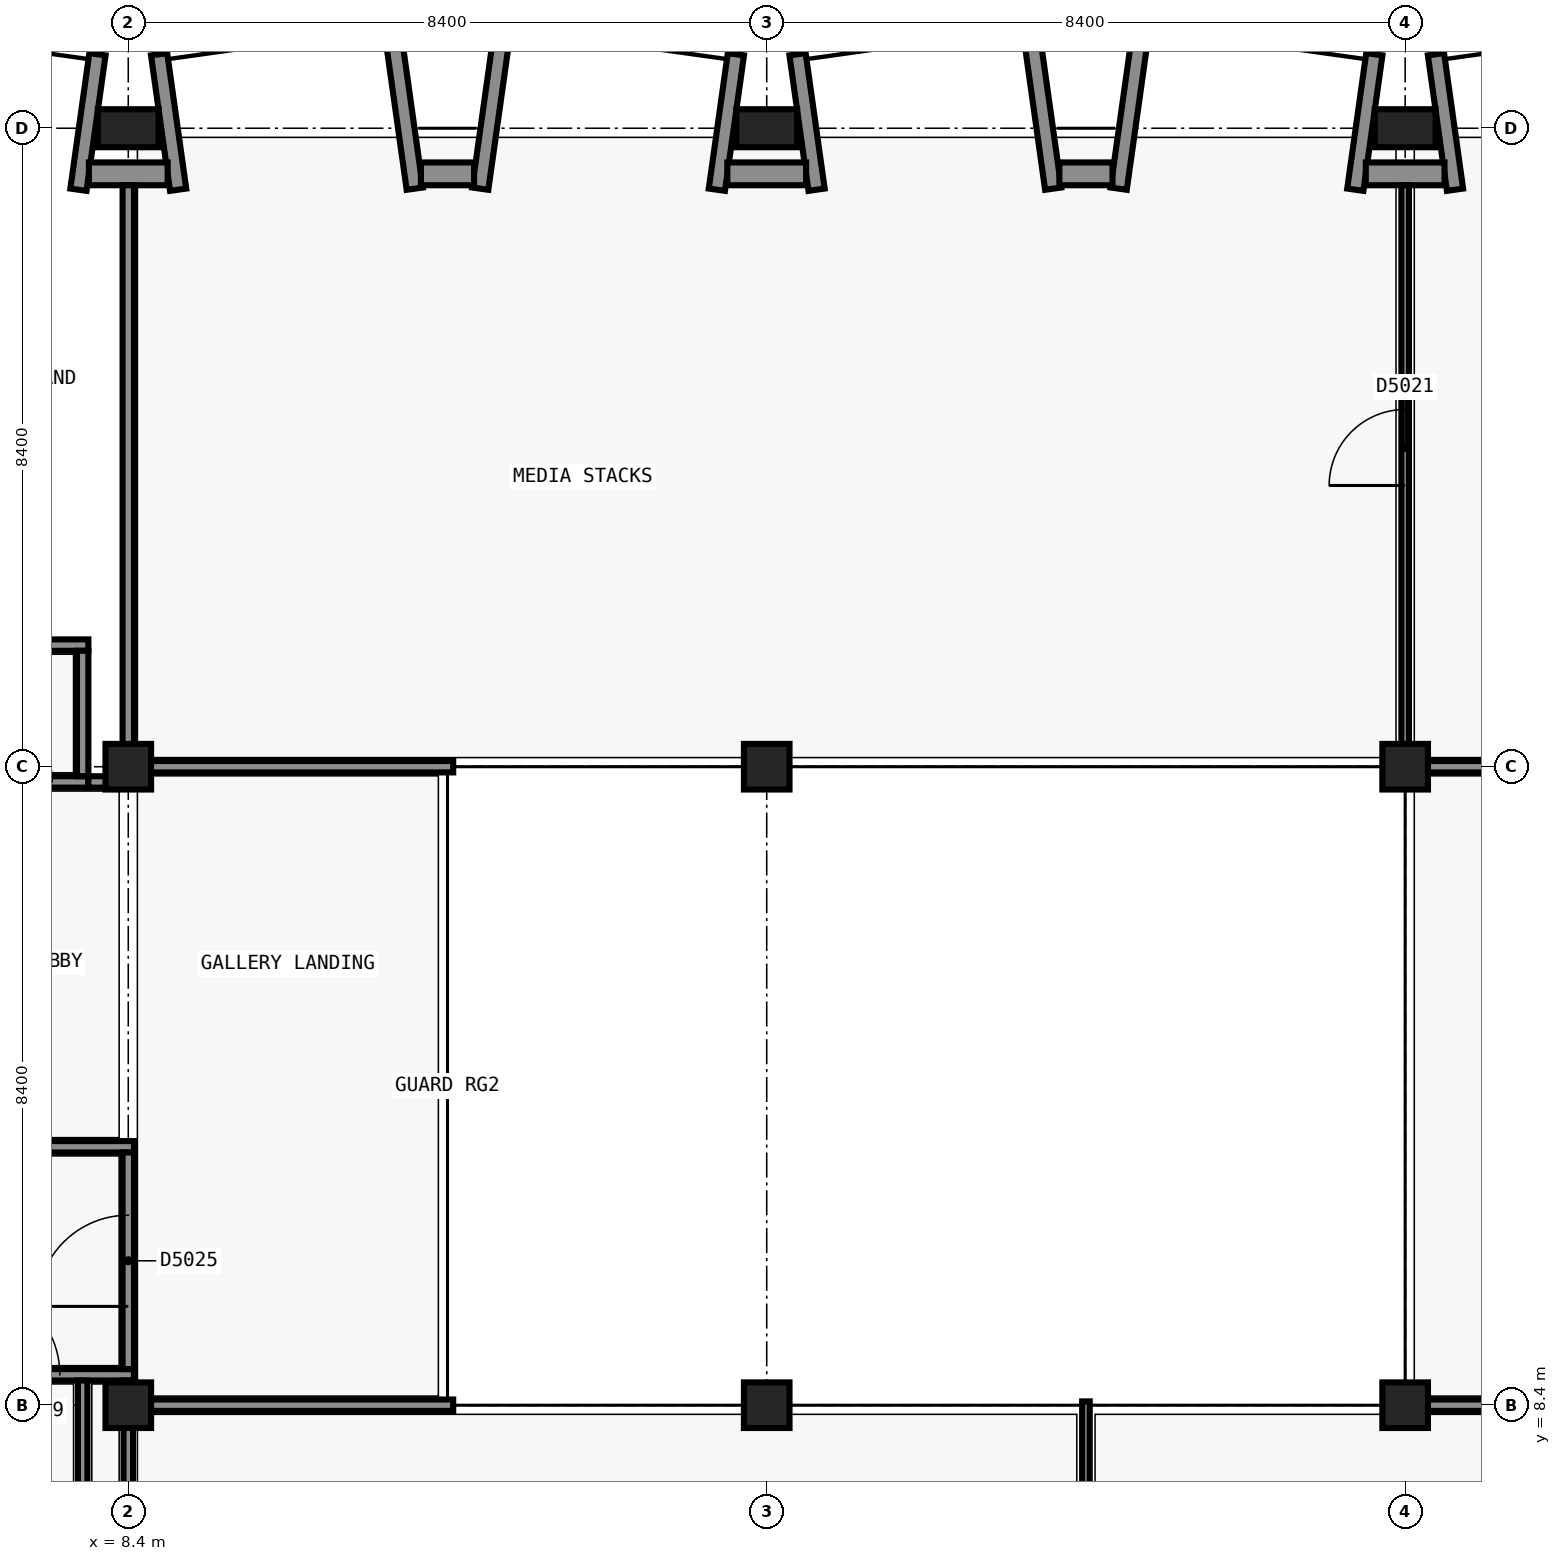
"""IFC4 building model, lengths in metres.
Left out: names, types, materials, properties, quantities, classifications, styles, units other than length and angle.
Written with IfcOpenShell. Run it as: python <this file> out.ifc"""

import sys

from ifc_helpers import new_model, si_unit, direction, frame, frame_2d, origin, origin_2d, place, context, subcontext, project, spatial, rectangle, extrude, element, fill, save


model = new_model("IFC4")
c1 = context("Model", 3, precision=1e-05, world=origin(), true_north=direction((0.0, 1.0)))
c2 = subcontext(c1, "Body", "Model", "MODEL_VIEW")
j1 = project(units=[si_unit("LENGTHUNIT", "METRE"), si_unit("PLANEANGLEUNIT", "RADIAN")], contexts=[c1])
p1 = place(None, origin())
s1 = spatial("IfcSite", under=j1, at=p1, CompositionType="ELEMENT")
p2 = place(p1, origin())
s2 = spatial("IfcBuilding", under=s1, at=p2, CompositionType="ELEMENT")
p3 = place(p2, frame((0.0, 0.0, 24.6)))
s3 = spatial("IfcBuildingStorey", under=s2, at=p3, CompositionType="ELEMENT", Elevation=24.6)
for number, where, z_axis, x_axis in (
    (1, (8.4, 8.4, 0.0), (0.0, 0.0, 1.0), (1.0, 0.0, 0.0)),
    (2, (8.4, 16.8, 0.0), (0.0, 0.0, 1.0), (1.0, 0.0, 0.0)),
):
    element("IfcColumn", number, at=place(p3, frame(where, z_axis=z_axis, x_axis=x_axis)), inside=s3, PredefinedType="COLUMN", context=c2, shape_type="SweptSolid", body=[
        extrude(rectangle(XDim=0.6, YDim=0.6, at=origin_2d()), origin(), (0.0, 0.0, 1.0), 4.5),
    ])
p4 = place(p3, frame((8.4, 25.2, 0.0), z_axis=(0.0, 0.0, 1.0), x_axis=(1.0, 0.0, 0.0)))
e3 = element("IfcColumn", 3, at=p4, inside=s3, PredefinedType="COLUMN", context=c2, shape_type="SweptSolid", body=[
    extrude(rectangle(XDim=0.8, YDim=0.5, at=origin_2d()), origin(), (0.0, 0.0, 1.0), 4.5),
])
for number, where, z_axis, x_axis in (
    (4, (16.8, 8.4, 0.0), (0.0, 0.0, 1.0), (1.0, 0.0, 0.0)),
    (5, (16.8, 16.8, 0.0), (0.0, 0.0, 1.0), (1.0, 0.0, 0.0)),
):
    element("IfcColumn", number, at=place(p3, frame(where, z_axis=z_axis, x_axis=x_axis)), inside=s3, PredefinedType="COLUMN", context=c2, shape_type="SweptSolid", body=[
        extrude(rectangle(XDim=0.6, YDim=0.6, at=origin_2d()), origin(), (0.0, 0.0, 1.0), 4.5),
    ])
p5 = place(p3, frame((16.8, 25.2, 0.0), z_axis=(0.0, 0.0, 1.0), x_axis=(1.0, 0.0, 0.0)))
e6 = element("IfcColumn", 6, at=p5, inside=s3, PredefinedType="COLUMN", context=c2, shape_type="SweptSolid", body=[
    extrude(rectangle(XDim=0.8, YDim=0.5, at=origin_2d()), origin(), (0.0, 0.0, 1.0), 4.5),
])
for number, where, z_axis, x_axis in (
    (7, (25.2, 8.4, 0.0), (0.0, 0.0, 1.0), (1.0, 0.0, 0.0)),
    (8, (25.2, 16.8, 0.0), (0.0, 0.0, 1.0), (1.0, 0.0, 0.0)),
):
    element("IfcColumn", number, at=place(p3, frame(where, z_axis=z_axis, x_axis=x_axis)), inside=s3, PredefinedType="COLUMN", context=c2, shape_type="SweptSolid", body=[
        extrude(rectangle(XDim=0.6, YDim=0.6, at=origin_2d()), origin(), (0.0, 0.0, 1.0), 4.5),
    ])
p6 = place(p3, frame((25.2, 25.2, 0.0), z_axis=(0.0, 0.0, 1.0), x_axis=(1.0, 0.0, 0.0)))
e9 = element("IfcColumn", 9, at=p6, inside=s3, PredefinedType="COLUMN", context=c2, shape_type="SweptSolid", body=[
    extrude(rectangle(XDim=0.8, YDim=0.5, at=origin_2d()), origin(), (0.0, 0.0, 1.0), 4.5),
])
for number, where, z_axis, x_axis in (
    (10, (7.744, 24.391, 0.0), (0.0, 0.0, 1.0), (0.139, 0.99, 0.0)),
    (11, (9.056, 24.391, 0.0), (0.0, 0.0, 1.0), (-0.139, 0.99, 0.0)),
):
    element("IfcWall", number, at=place(p3, frame(where, z_axis=z_axis, x_axis=x_axis)), inside=s3, PredefinedType="SOLIDWALL", context=c2, shape_type="SweptSolid", body=[
        extrude(rectangle(XDim=1.8, YDim=0.215, at=frame_2d((0.9, 0.0))), origin(), (0.0, 0.0, 1.0), 4.2),
    ])
p7 = place(p3, frame((12.169, 24.405, 0.0), z_axis=(0.0, 0.0, 1.0), x_axis=(-0.139141913905, 0.990272451295, 0.0)))
e12 = element("IfcWall", 12, at=p7, inside=s3, PredefinedType="SOLIDWALL", context=c2, shape_type="SweptSolid", body=[
    extrude(rectangle(XDim=2.219, YDim=0.215, at=frame_2d((1.11, 0.0))), origin(), (0.0, 0.0, 1.0), 4.2),
])
p8 = place(p3, frame((13.031, 24.405, 0.0), z_axis=(0.0, 0.0, 1.0), x_axis=(0.139249775508, 0.99025728981, 0.0)))
e13 = element("IfcWall", 13, at=p8, inside=s3, PredefinedType="SOLIDWALL", context=c2, shape_type="SweptSolid", body=[
    extrude(rectangle(XDim=2.22, YDim=0.215, at=frame_2d((1.11, 0.0))), origin(), (0.0, 0.0, 1.0), 4.2),
])
for number, where, z_axis, x_axis in (
    (14, (16.144, 24.391, 0.0), (0.0, 0.0, 1.0), (0.139, 0.99, 0.0)),
    (15, (17.456, 24.391, 0.0), (0.0, 0.0, 1.0), (-0.139, 0.99, 0.0)),
):
    element("IfcWall", number, at=place(p3, frame(where, z_axis=z_axis, x_axis=x_axis)), inside=s3, PredefinedType="SOLIDWALL", context=c2, shape_type="SweptSolid", body=[
        extrude(rectangle(XDim=1.8, YDim=0.215, at=frame_2d((0.9, 0.0))), origin(), (0.0, 0.0, 1.0), 4.2),
    ])
for number, where, z_axis, x_axis in (
    (16, (20.569, 24.405, 0.0), (0.0, 0.0, 1.0), (-0.139, 0.99, 0.0)),
    (17, (21.431, 24.405, 0.0), (0.0, 0.0, 1.0), (0.139, 0.99, 0.0)),
):
    element("IfcWall", number, at=place(p3, frame(where, z_axis=z_axis, x_axis=x_axis)), inside=s3, PredefinedType="SOLIDWALL", context=c2, shape_type="SweptSolid", body=[
        extrude(rectangle(XDim=2.219, YDim=0.215, at=frame_2d((1.11, 0.0))), origin(), (0.0, 0.0, 1.0), 4.2),
    ])
for number, where, z_axis, x_axis in (
    (18, (24.544, 24.391, 0.0), (0.0, 0.0, 1.0), (0.139, 0.99, 0.0)),
    (19, (25.856, 24.391, 0.0), (0.0, 0.0, 1.0), (-0.139, 0.99, 0.0)),
):
    element("IfcWall", number, at=place(p3, frame(where, z_axis=z_axis, x_axis=x_axis)), inside=s3, PredefinedType="SOLIDWALL", context=c2, shape_type="SweptSolid", body=[
        extrude(rectangle(XDim=1.8, YDim=0.215, at=frame_2d((0.9, 0.0))), origin(), (0.0, 0.0, 1.0), 4.2),
    ])
p9 = place(p3, frame((7.882, 24.6, 0.0), z_axis=(0.0, 0.0, 1.0), x_axis=(1.0, 0.0, 0.0)))
e20 = element("IfcWall", 20, at=p9, inside=s3, PredefinedType="SOLIDWALL", context=c2, shape_type="SweptSolid", body=[
    extrude(rectangle(XDim=1.036, YDim=0.3, at=frame_2d((0.518, 0.0))), origin(), (0.0, 0.0, 1.0), 4.2),
])
p10 = place(p3, frame((12.25, 24.6, 0.0), z_axis=(0.0, 0.0, 1.0), x_axis=(1.0, 0.0, 0.0)))
e21 = element("IfcWall", 21, at=p10, inside=s3, PredefinedType="SOLIDWALL", context=c2, shape_type="SweptSolid", body=[
    extrude(rectangle(XDim=0.699, YDim=0.3, at=frame_2d((0.35, 0.0))), origin(), (0.0, 0.0, 1.0), 4.2),
])
p11 = place(p3, frame((16.282, 24.6, 0.0), z_axis=(0.0, 0.0, 1.0), x_axis=(1.0, 0.0, 0.0)))
e22 = element("IfcWall", 22, at=p11, inside=s3, PredefinedType="SOLIDWALL", context=c2, shape_type="SweptSolid", body=[
    extrude(rectangle(XDim=1.036, YDim=0.3, at=frame_2d((0.518, 0.0))), origin(), (0.0, 0.0, 1.0), 4.2),
])
p12 = place(p3, frame((20.65, 24.6, 0.0), z_axis=(0.0, 0.0, 1.0), x_axis=(1.0, 0.0, 0.0)))
e23 = element("IfcWall", 23, at=p12, inside=s3, PredefinedType="SOLIDWALL", context=c2, shape_type="SweptSolid", body=[
    extrude(rectangle(XDim=0.699, YDim=0.3, at=frame_2d((0.35, 0.0))), origin(), (0.0, 0.0, 1.0), 4.2),
])
p13 = place(p3, frame((24.682, 24.6, 0.0), z_axis=(0.0, 0.0, 1.0), x_axis=(1.0, 0.0, 0.0)))
e24 = element("IfcWall", 24, at=p13, inside=s3, PredefinedType="SOLIDWALL", context=c2, shape_type="SweptSolid", body=[
    extrude(rectangle(XDim=1.036, YDim=0.3, at=frame_2d((0.518, 0.0))), origin(), (0.0, 0.0, 1.0), 4.2),
])
p14 = place(p3, frame((8.325, 8.4, 0.0), z_axis=(0.0, 0.0, 1.0), x_axis=(1.0, 0.0, 0.0)))
e25 = element("IfcWall", 25, at=p14, inside=s3, PredefinedType="PARTITIONING", context=c2, shape_type="SweptSolid", body=[
    extrude(rectangle(XDim=4.35, YDim=0.15, at=frame_2d((2.175, 0.0))), origin(), (0.0, 0.0, 1.0), 3.5),
])
p15 = place(p3, frame((25.125, 8.4, 0.0), z_axis=(0.0, 0.0, 1.0), x_axis=(1.0, 0.0, 0.0)))
e26 = element("IfcWall", 26, at=p15, inside=s3, PredefinedType="PARTITIONING", context=c2, shape_type="SweptSolid", body=[
    extrude(rectangle(XDim=2.375, YDim=0.15, at=frame_2d((1.188, 0.0))), origin(), (0.0, 0.0, 1.0), 3.5),
])
p16 = place(p3, frame((6.1, 16.6, 0.0), z_axis=(0.0, 0.0, 1.0), x_axis=(1.0, 0.0, 0.0)))
e27 = element("IfcWall", 27, at=p16, inside=s3, PredefinedType="PARTITIONING", context=c2, shape_type="SweptSolid", body=[
    extrude(rectangle(XDim=1.775, YDim=0.15, at=frame_2d((0.887, 0.0))), origin(), (0.0, 0.0, 1.0), 3.7),
])
p17 = place(p16, frame((0.3, 0.0, 0.0)))
e28 = element("IfcOpeningElement", 28, at=p17, cuts=e27, PredefinedType="OPENING", context=c2, shape_type="SweptSolid", body=[
    extrude(rectangle(XDim=1.0, YDim=2.1, at=frame_2d((0.5, 1.05))), frame((0.0, 0.085, 0.0), z_axis=(0.0, -1.0, 0.0), x_axis=(1.0, 0.0, 0.0)), (0.0, 0.0, 1.0), 0.17),
])
p18 = place(p3, frame((8.325, 16.8, 0.0), z_axis=(0.0, 0.0, 1.0), x_axis=(1.0, 0.0, 0.0)))
e29 = element("IfcWall", 29, at=p18, inside=s3, PredefinedType="PARTITIONING", context=c2, shape_type="SweptSolid", body=[
    extrude(rectangle(XDim=4.35, YDim=0.15, at=frame_2d((2.175, 0.0))), origin(), (0.0, 0.0, 1.0), 3.5),
])
p19 = place(p3, frame((25.125, 16.8, 0.0), z_axis=(0.0, 0.0, 1.0), x_axis=(1.0, 0.0, 0.0)))
e30 = element("IfcWall", 30, at=p19, inside=s3, PredefinedType="PARTITIONING", context=c2, shape_type="SweptSolid", body=[
    extrude(rectangle(XDim=7.575, YDim=0.15, at=frame_2d((3.788, 0.0))), origin(), (0.0, 0.0, 1.0), 3.5),
])
p20 = place(p19, frame((3.775, 0.0, 0.0)))
e31 = element("IfcOpeningElement", 31, at=p20, cuts=e30, PredefinedType="OPENING", context=c2, shape_type="SweptSolid", body=[
    extrude(rectangle(XDim=1.0, YDim=2.1, at=frame_2d((0.5, 1.05))), frame((0.0, 0.085, 0.0), z_axis=(0.0, -1.0, 0.0), x_axis=(1.0, 0.0, 0.0)), (0.0, 0.0, 1.0), 0.17),
])
p21 = place(p3, frame((6.1, 8.8, 0.0), z_axis=(0.0, 0.0, 1.0), x_axis=(1.0, 0.0, 0.0)))
e32 = element("IfcWall", 32, at=p21, inside=s3, PredefinedType="SOLIDWALL", context=c2, shape_type="SweptSolid", body=[
    extrude(rectangle(XDim=2.375, YDim=0.15, at=frame_2d((1.188, 0.0))), origin(), (0.0, 0.0, 1.0), 3.5),
])
p22 = place(p21, frame((0.2, 0.0, 0.0)))
e33 = element("IfcOpeningElement", 33, at=p22, cuts=e32, PredefinedType="OPENING", context=c2, shape_type="SweptSolid", body=[
    extrude(rectangle(XDim=1.2, YDim=2.1, at=frame_2d((0.6, 1.05))), frame((0.0, 0.085, 0.0), z_axis=(0.0, -1.0, 0.0), x_axis=(1.0, 0.0, 0.0)), (0.0, 0.0, 1.0), 0.17),
])
p23 = place(p3, frame((3.3, 11.8, 0.0), z_axis=(0.0, 0.0, 1.0), x_axis=(1.0, 0.0, 0.0)))
e34 = element("IfcWall", 34, at=p23, inside=s3, PredefinedType="SOLIDWALL", context=c2, shape_type="SweptSolid", body=[
    extrude(rectangle(XDim=5.175, YDim=0.15, at=frame_2d((2.587, 0.0))), origin(), (0.0, 0.0, 1.0), 3.5),
])
p24 = place(p3, frame((7.875, 16.6, 0.0), z_axis=(0.0, 0.0, 1.0), x_axis=(1.0, 0.0, 0.0)))
e35 = element("IfcWall", 35, at=p24, inside=s3, PredefinedType="SOLIDWALL", context=c2, shape_type="SweptSolid", body=[
    extrude(rectangle(XDim=0.6, YDim=0.15, at=frame_2d((0.3, 0.0))), origin(), (0.0, 0.0, 1.0), 3.5),
])
p25 = place(p3, frame((6.1, 18.4, 0.0), z_axis=(0.0, 0.0, 1.0), x_axis=(1.0, 0.0, 0.0)))
e36 = element("IfcWall", 36, at=p25, inside=s3, PredefinedType="SOLIDWALL", context=c2, shape_type="SweptSolid", body=[
    extrude(rectangle(XDim=1.775, YDim=0.15, at=frame_2d((0.887, 0.0))), origin(), (0.0, 0.0, 1.0), 4.2),
])
p26 = place(p3, frame((8.4, 8.475, 0.0), z_axis=(0.0, 0.0, 1.0), x_axis=(0.0, 1.0, 0.0)))
e37 = element("IfcWall", 37, at=p26, inside=s3, PredefinedType="PARTITIONING", context=c2, shape_type="SweptSolid", body=[
    extrude(rectangle(XDim=0.25, YDim=0.15, at=frame_2d((0.125, 0.0))), origin(), (0.0, 0.0, 1.0), 3.5),
])
p27 = place(p3, frame((8.4, 8.875, 0.0), z_axis=(0.0, 0.0, 1.0), x_axis=(0.0, 1.0, 0.0)))
e38 = element("IfcWall", 38, at=p27, inside=s3, PredefinedType="SOLIDWALL", context=c2, shape_type="SweptSolid", body=[
    extrude(rectangle(XDim=2.85, YDim=0.15, at=frame_2d((1.425, 0.0))), origin(), (0.0, 0.0, 1.0), 3.5),
])
p28 = place(p27, frame((0.825, 0.0, 0.0)))
e39 = element("IfcOpeningElement", 39, at=p28, cuts=e38, PredefinedType="OPENING", context=c2, shape_type="SweptSolid", body=[
    extrude(rectangle(XDim=1.2, YDim=2.1, at=frame_2d((0.6, 1.05))), frame((0.0, 0.085, 0.0), z_axis=(0.0, -1.0, 0.0), x_axis=(1.0, 0.0, 0.0)), (0.0, 0.0, 1.0), 0.17),
])
p29 = place(p3, frame((7.8, 16.675, 0.0), z_axis=(0.0, 0.0, 1.0), x_axis=(0.0, 1.0, 0.0)))
e40 = element("IfcWall", 40, at=p29, inside=s3, PredefinedType="SOLIDWALL", context=c2, shape_type="SweptSolid", body=[
    extrude(rectangle(XDim=1.65, YDim=0.15, at=frame_2d((0.825, 0.0))), origin(), (0.0, 0.0, 1.0), 3.7),
])
p30 = place(p3, frame((8.4, 16.875, 0.0), z_axis=(0.0, 0.0, 1.0), x_axis=(0.0, 1.0, 0.0)))
e41 = element("IfcWall", 41, at=p30, inside=s3, PredefinedType="SOLIDWALL", context=c2, shape_type="SweptSolid", body=[
    extrude(rectangle(XDim=7.575, YDim=0.15, at=frame_2d((3.788, 0.0))), origin(), (0.0, 0.0, 1.0), 3.5),
])
p31 = place(p3, frame((7.8, 7.062, 0.0), z_axis=(0.0, 0.0, 1.0), x_axis=(0.0, 1.0, 0.0)))
e42 = element("IfcWall", 42, at=p31, inside=s3, PredefinedType="PARTITIONING", context=c2, shape_type="SweptSolid", body=[
    extrude(rectangle(XDim=1.663, YDim=0.125, at=frame_2d((0.831, 0.0))), origin(), (0.0, 0.0, 1.0), 3.7),
])
p32 = place(p3, frame((8.4, 0.75, 0.0), z_axis=(0.0, 0.0, 1.0), x_axis=(0.0, 1.0, 0.0)))
e43 = element("IfcWall", 43, at=p32, inside=s3, PredefinedType="PARTITIONING", context=c2, shape_type="SweptSolid", body=[
    extrude(rectangle(XDim=7.575, YDim=0.125, at=frame_2d((3.788, 0.0))), origin(), (0.0, 0.0, 1.0), 3.5),
])
p33 = place(p3, frame((21.0, 0.75, 0.0), z_axis=(0.0, 0.0, 1.0), x_axis=(0.0, 1.0, 0.0)))
e44 = element("IfcWall", 44, at=p33, inside=s3, PredefinedType="PARTITIONING", context=c2, shape_type="SweptSolid", body=[
    extrude(rectangle(XDim=7.7, YDim=0.1, at=frame_2d((3.85, 0.0))), origin(), (0.0, 0.0, 1.0), 3.5),
])
p34 = place(p33, frame((2.95, 0.0, 0.0)))
e45 = element("IfcOpeningElement", 45, at=p34, cuts=e44, PredefinedType="OPENING", context=c2, shape_type="SweptSolid", body=[
    extrude(rectangle(XDim=1.0, YDim=2.1, at=frame_2d((0.5, 1.05))), frame((0.0, 0.06, 0.0), z_axis=(0.0, -1.0, 0.0), x_axis=(1.0, 0.0, 0.0)), (0.0, 0.0, 1.0), 0.12),
])
p35 = place(p3, frame((25.2, 16.875, 0.0), z_axis=(0.0, 0.0, 1.0), x_axis=(0.0, 1.0, 0.0)))
e46 = element("IfcWall", 46, at=p35, inside=s3, PredefinedType="PARTITIONING", context=c2, shape_type="SweptSolid", body=[
    extrude(rectangle(XDim=7.575, YDim=0.1, at=frame_2d((3.788, 0.0))), origin(), (0.0, 0.0, 1.0), 3.5),
])
p36 = place(p35, frame((3.625, 0.0, 0.0)))
e47 = element("IfcOpeningElement", 47, at=p36, cuts=e46, PredefinedType="OPENING", context=c2, shape_type="SweptSolid", body=[
    extrude(rectangle(XDim=1.0, YDim=2.1, at=frame_2d((0.5, 1.05))), frame((0.0, 0.06, 0.0), z_axis=(0.0, -1.0, 0.0), x_axis=(1.0, 0.0, 0.0)), (0.0, 0.0, 1.0), 0.12),
])
p37 = place(p22, origin())
e48 = element("IfcDoor", 48, at=p37, inside=s3, OperationType="SINGLE_SWING_RIGHT", PredefinedType="DOOR", context=c2, shape_type="SweptSolid", body=[
    extrude(rectangle(XDim=1.2, YDim=2.1, at=frame_2d((0.6, 1.05))), frame((0.0, 0.025, 0.0), z_axis=(0.0, -1.0, 0.0), x_axis=(1.0, 0.0, 0.0)), (0.0, 0.0, 1.0), 0.05),
])
fill(e33, e48)
p38 = place(p17, origin())
e49 = element("IfcDoor", 49, at=p38, inside=s3, OperationType="SINGLE_SWING_RIGHT", PredefinedType="DOOR", context=c2, shape_type="SweptSolid", body=[
    extrude(rectangle(XDim=1.0, YDim=2.1, at=frame_2d((0.5, 1.05))), frame((0.0, 0.025, 0.0), z_axis=(0.0, -1.0, 0.0), x_axis=(1.0, 0.0, 0.0)), (0.0, 0.0, 1.0), 0.05),
])
fill(e28, e49)
p39 = place(p36, origin())
e50 = element("IfcDoor", 50, at=p39, inside=s3, OperationType="SINGLE_SWING_RIGHT", PredefinedType="DOOR", context=c2, shape_type="SweptSolid", body=[
    extrude(rectangle(XDim=1.0, YDim=2.1, at=frame_2d((0.5, 1.05))), frame((0.0, 0.025, 0.0), z_axis=(0.0, -1.0, 0.0), x_axis=(1.0, 0.0, 0.0)), (0.0, 0.0, 1.0), 0.05),
])
fill(e47, e50)
p40 = place(p28, origin())
e51 = element("IfcDoor", 51, at=p40, inside=s3, OperationType="SINGLE_SWING_RIGHT", PredefinedType="DOOR", context=c2, shape_type="SweptSolid", body=[
    extrude(rectangle(XDim=1.2, YDim=2.1, at=frame_2d((0.6, 1.05))), frame((0.0, 0.025, 0.0), z_axis=(0.0, -1.0, 0.0), x_axis=(1.0, 0.0, 0.0)), (0.0, 0.0, 1.0), 0.05),
])
fill(e39, e51)
save(model, sys.argv[1])
